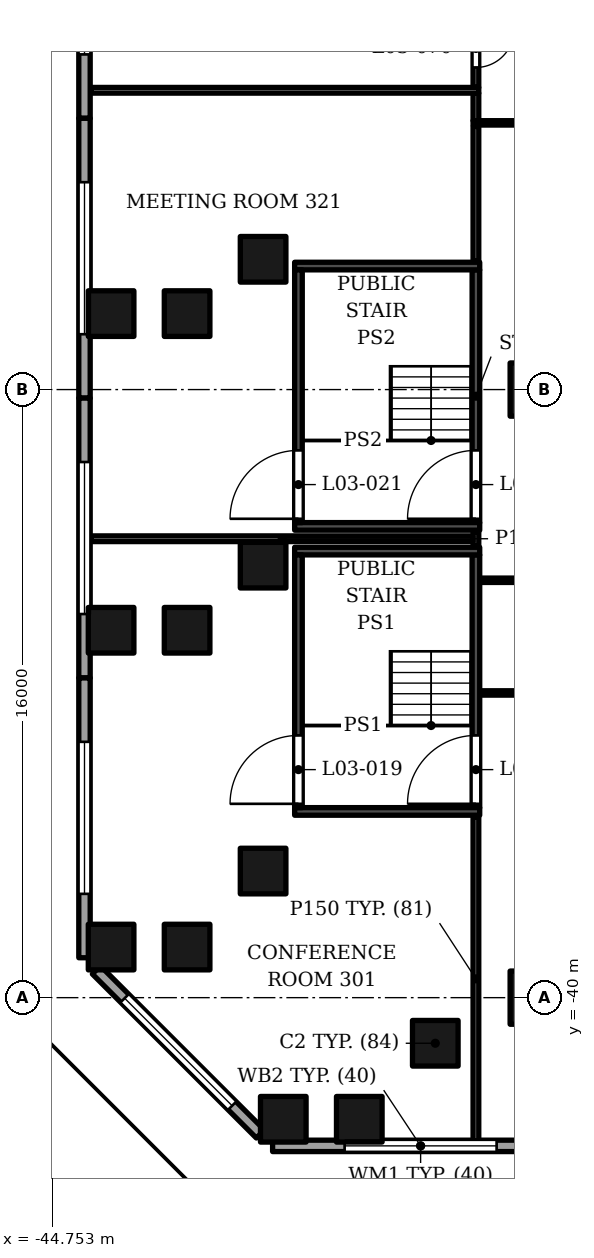
"""IFC4 building model, lengths in metres.
Left out: names, types, materials, properties, quantities, classifications, styles, units other than length and angle.
Written with IfcOpenShell. Run it as: python <this file> out.ifc"""

import sys

from ifc_helpers import new_model, si_unit, direction, frame, frame_2d, origin, origin_2d, place, context, subcontext, project, spatial, rectangle, extrude, element, fill, save


model = new_model("IFC4")
c1 = context("Model", 3, precision=1e-05, world=origin(), true_north=direction((0.0, 1.0)))
c2 = subcontext(c1, "Body", "Model", "MODEL_VIEW")
j1 = project(units=[si_unit("LENGTHUNIT", "METRE"), si_unit("PLANEANGLEUNIT", "RADIAN")], contexts=[c1])
p1 = place(None, origin())
s1 = spatial("IfcSite", under=j1, at=p1, CompositionType="ELEMENT")
p2 = place(p1, origin())
s2 = spatial("IfcBuilding", under=s1, at=p2, CompositionType="ELEMENT")
p3 = place(p2, frame((0.0, 0.0, 29.0)))
s3 = spatial("IfcBuildingStorey", under=s2, at=p3, CompositionType="ELEMENT", Elevation=29.0)
for number, where, z_axis, x_axis in (
    (1, (-32.0, -40.0, 0.0), (0.0, 0.0, 1.0), (1.0, 0.0, 0.0)),
    (2, (-32.0, -24.0, 0.0), (0.0, 0.0, 1.0), (1.0, 0.0, 0.0)),
):
    element("IfcColumn", number, at=place(p3, frame(where, z_axis=z_axis, x_axis=x_axis)), inside=s3, PredefinedType="COLUMN", context=c2, shape_type="SweptSolid", body=[
        extrude(rectangle(XDim=1.4, YDim=1.4, at=origin_2d()), origin(), (0.0, 0.0, 1.0), 5.5),
    ])
for number, where, z_axis, x_axis in (
    (3, (-34.669, -41.2, 0.0), (0.0, 0.0, 1.0), (1.0, 0.0, 0.0)),
    (4, (-39.2, -36.669, 0.0), (0.0, 0.0, 1.0), (1.0, 0.0, 0.0)),
    (5, (-39.2, -28.62, 0.0), (0.0, 0.0, 1.0), (1.0, 0.0, 0.0)),
    (6, (-39.2, -20.572, 0.0), (0.0, 0.0, 1.0), (1.0, 0.0, 0.0)),
    (7, (-36.669, -43.2, 0.0), (0.0, 0.0, 1.0), (1.0, 0.0, 0.0)),
    (8, (-41.2, -38.669, 0.0), (0.0, 0.0, 1.0), (1.0, 0.0, 0.0)),
    (9, (-41.2, -30.333, 0.0), (0.0, 0.0, 1.0), (1.0, 0.0, 0.0)),
    (10, (-41.2, -22.001, 0.0), (0.0, 0.0, 1.0), (1.0, 0.0, 0.0)),
    (11, (-38.669, -43.2, 0.0), (0.0, 0.0, 1.0), (1.0, 0.0, 0.0)),
    (12, (-43.2, -38.669, 0.0), (0.0, 0.0, 1.0), (1.0, 0.0, 0.0)),
    (13, (-43.2, -30.333, 0.0), (0.0, 0.0, 1.0), (1.0, 0.0, 0.0)),
    (14, (-43.2, -22.001, 0.0), (0.0, 0.0, 1.0), (1.0, 0.0, 0.0)),
):
    element("IfcColumn", number, at=place(p3, frame(where, z_axis=z_axis, x_axis=x_axis)), inside=s3, PredefinedType="COLUMN", context=c2, shape_type="SweptSolid", body=[
        extrude(rectangle(XDim=1.2, YDim=1.2, at=origin_2d()), origin(), (0.0, 0.0, 1.0), 5.5),
    ])
p4 = place(p3, frame((-38.95, -43.9, 0.0), z_axis=(0.0, 0.0, 1.0), x_axis=(1.0, 0.0, 0.0)))
e15 = element("IfcWall", 15, at=p4, inside=s3, PredefinedType="SOLIDWALL", context=c2, shape_type="SweptSolid", body=[
    extrude(rectangle(XDim=7.79, YDim=0.3, at=frame_2d((3.895, 0.0))), origin(), (0.0, 0.0, 1.0), 4.1),
])
p5 = place(p4, frame((1.895, 0.0, 1.0)))
e16 = element("IfcOpeningElement", 16, at=p5, cuts=e15, PredefinedType="OPENING", context=c2, shape_type="SweptSolid", body=[
    extrude(rectangle(XDim=4.0, YDim=1.8, at=frame_2d((2.0, 0.9))), frame((0.0, 0.16, 0.0), z_axis=(0.0, -1.0, 0.0), x_axis=(1.0, 0.0, 0.0)), (0.0, 0.0, 1.0), 0.32),
])
p6 = place(p3, frame((-43.9, -9.5, 0.0), z_axis=(0.0, 0.0, 1.0), x_axis=(0.0, -1.0, 0.0)))
e17 = element("IfcWall", 17, at=p6, inside=s3, PredefinedType="SOLIDWALL", context=c2, shape_type="SweptSolid", body=[
    extrude(rectangle(XDim=7.363, YDim=0.3, at=frame_2d((3.681, 0.0))), origin(), (0.0, 0.0, 1.0), 4.1),
])
p7 = place(p6, frame((1.681, 0.0, 1.0)))
e18 = element("IfcOpeningElement", 18, at=p7, cuts=e17, PredefinedType="OPENING", context=c2, shape_type="SweptSolid", body=[
    extrude(rectangle(XDim=4.0, YDim=1.8, at=frame_2d((2.0, 0.9))), frame((0.0, 0.16, 0.0), z_axis=(0.0, -1.0, 0.0), x_axis=(1.0, 0.0, 0.0)), (0.0, 0.0, 1.0), 0.32),
])
p8 = place(p3, frame((-43.9, -16.863, 0.0), z_axis=(0.0, 0.0, 1.0), x_axis=(0.0, -1.0, 0.0)))
e19 = element("IfcWall", 19, at=p8, inside=s3, PredefinedType="SOLIDWALL", context=c2, shape_type="SweptSolid", body=[
    extrude(rectangle(XDim=7.363, YDim=0.3, at=frame_2d((3.681, 0.0))), origin(), (0.0, 0.0, 1.0), 4.1),
])
p9 = place(p8, frame((1.681, 0.0, 1.0)))
e20 = element("IfcOpeningElement", 20, at=p9, cuts=e19, PredefinedType="OPENING", context=c2, shape_type="SweptSolid", body=[
    extrude(rectangle(XDim=4.0, YDim=1.8, at=frame_2d((2.0, 0.9))), frame((0.0, 0.16, 0.0), z_axis=(0.0, -1.0, 0.0), x_axis=(1.0, 0.0, 0.0)), (0.0, 0.0, 1.0), 0.32),
])
p10 = place(p3, frame((-43.9, -24.225, 0.0), z_axis=(0.0, 0.0, 1.0), x_axis=(0.0, -1.0, 0.0)))
e21 = element("IfcWall", 21, at=p10, inside=s3, PredefinedType="SOLIDWALL", context=c2, shape_type="SweptSolid", body=[
    extrude(rectangle(XDim=7.362, YDim=0.3, at=frame_2d((3.681, 0.0))), origin(), (0.0, 0.0, 1.0), 4.1),
])
p11 = place(p10, frame((1.681, 0.0, 1.0)))
e22 = element("IfcOpeningElement", 22, at=p11, cuts=e21, PredefinedType="OPENING", context=c2, shape_type="SweptSolid", body=[
    extrude(rectangle(XDim=4.0, YDim=1.8, at=frame_2d((2.0, 0.9))), frame((0.0, 0.16, 0.0), z_axis=(0.0, -1.0, 0.0), x_axis=(1.0, 0.0, 0.0)), (0.0, 0.0, 1.0), 0.32),
])
p12 = place(p3, frame((-43.9, -31.587, 0.0), z_axis=(0.0, 0.0, 1.0), x_axis=(0.0, -1.0, 0.0)))
e23 = element("IfcWall", 23, at=p12, inside=s3, PredefinedType="SOLIDWALL", context=c2, shape_type="SweptSolid", body=[
    extrude(rectangle(XDim=7.363, YDim=0.3, at=frame_2d((3.681, 0.0))), origin(), (0.0, 0.0, 1.0), 4.1),
])
p13 = place(p12, frame((1.681, 0.0, 1.0)))
e24 = element("IfcOpeningElement", 24, at=p13, cuts=e23, PredefinedType="OPENING", context=c2, shape_type="SweptSolid", body=[
    extrude(rectangle(XDim=4.0, YDim=1.8, at=frame_2d((2.0, 0.9))), frame((0.0, 0.16, 0.0), z_axis=(0.0, -1.0, 0.0), x_axis=(1.0, 0.0, 0.0)), (0.0, 0.0, 1.0), 0.32),
])
p14 = place(p3, frame((-43.588, -39.271, 0.0), z_axis=(0.0, 0.0, 1.0), x_axis=(0.707106781187, -0.707106781187, 0.0)))
e25 = element("IfcWall", 25, at=p14, inside=s3, PredefinedType="SOLIDWALL", context=c2, shape_type="SweptSolid", body=[
    extrude(rectangle(XDim=6.105, YDim=0.3, at=frame_2d((3.052, 0.0))), origin(), (0.0, 0.0, 1.0), 4.1),
])
p15 = place(p14, frame((1.052, 0.0, 1.0)))
e26 = element("IfcOpeningElement", 26, at=p15, cuts=e25, PredefinedType="OPENING", context=c2, shape_type="SweptSolid", body=[
    extrude(rectangle(XDim=4.0, YDim=1.8, at=frame_2d((2.0, 0.9))), frame((0.0, 0.16, 0.0), z_axis=(0.0, -1.0, 0.0), x_axis=(1.0, 0.0, 0.0)), (0.0, 0.0, 1.0), 0.32),
])
p16 = place(p3, frame((-39.0, -43.85, 5.5), z_axis=(0.0, 0.0, 1.0), x_axis=(1.0, 0.0, 0.0)))
e27 = element("IfcWall", 27, at=p16, inside=s3, PredefinedType="PARAPET", context=c2, shape_type="SweptSolid", body=[
    extrude(rectangle(XDim=1.25, YDim=0.3, at=frame_2d((0.625, 0.0))), origin(), (0.0, 0.0, 1.0), 1.1),
])
for number, where, z_axis, x_axis in (
    (28, (-43.85, -9.605, 5.5), (0.0, 0.0, 1.0), (0.0, -1.0, 0.0)),
    (29, (-43.85, -24.302, 5.5), (0.0, 0.0, 1.0), (0.0, -1.0, 0.0)),
):
    element("IfcWall", number, at=place(p3, frame(where, z_axis=z_axis, x_axis=x_axis)), inside=s3, PredefinedType="PARAPET", context=c2, shape_type="SweptSolid", body=[
        extrude(rectangle(XDim=14.698, YDim=0.3, at=frame_2d((7.349, 0.0))), origin(), (0.0, 0.0, 1.0), 1.1),
    ])
p17 = place(p3, frame((-43.745, -39.042, 5.5), z_axis=(0.0, 0.0, 1.0), x_axis=(0.70708898898, -0.707124572946, 0.0)))
e30 = element("IfcWall", 30, at=p17, inside=s3, PredefinedType="PARAPET", context=c2, shape_type="SweptSolid", body=[
    extrude(rectangle(XDim=6.861, YDim=0.3, at=frame_2d((3.431, 0.0))), origin(), (0.0, 0.0, 1.0), 1.1),
])
for number, where, z_axis, x_axis in (
    (31, (-38.37, -35.1, 0.0), (0.0, 0.0, 1.0), (1.0, 0.0, 0.0)),
    (32, (-38.37, -28.25, 0.0), (0.0, 0.0, 1.0), (1.0, 0.0, 0.0)),
):
    element("IfcWall", number, at=place(p3, frame(where, z_axis=z_axis, x_axis=x_axis)), inside=s3, PredefinedType="SOLIDWALL", context=c2, shape_type="SweptSolid", body=[
        extrude(rectangle(XDim=4.87, YDim=0.2, at=frame_2d((2.435, 0.0))), origin(), (0.0, 0.0, 1.0), 5.05),
    ])
p18 = place(p3, frame((-38.27, -35.0, 0.0), z_axis=(0.0, 0.0, 1.0), x_axis=(0.0, 1.0, 0.0)))
e33 = element("IfcWall", 33, at=p18, inside=s3, PredefinedType="SOLIDWALL", context=c2, shape_type="SweptSolid", body=[
    extrude(rectangle(XDim=6.65, YDim=0.2, at=frame_2d((3.325, 0.0))), origin(), (0.0, 0.0, 1.0), 5.05),
])
p19 = place(p18, frame((0.1, 0.0, 0.0)))
e34 = element("IfcOpeningElement", 34, at=p19, cuts=e33, PredefinedType="OPENING", context=c2, shape_type="SweptSolid", body=[
    extrude(rectangle(XDim=1.8, YDim=2.4, at=frame_2d((0.9, 1.2))), frame((0.0, 0.11, 0.0), z_axis=(0.0, -1.0, 0.0), x_axis=(1.0, 0.0, 0.0)), (0.0, 0.0, 1.0), 0.22),
])
p20 = place(p3, frame((-33.6, -35.0, 0.0), z_axis=(0.0, 0.0, 1.0), x_axis=(0.0, 1.0, 0.0)))
e35 = element("IfcWall", 35, at=p20, inside=s3, PredefinedType="SOLIDWALL", context=c2, shape_type="SweptSolid", body=[
    extrude(rectangle(XDim=6.65, YDim=0.2, at=frame_2d((3.325, 0.0))), origin(), (0.0, 0.0, 1.0), 5.05),
])
p21 = place(p20, frame((0.1, 0.0, 0.0)))
e36 = element("IfcOpeningElement", 36, at=p21, cuts=e35, PredefinedType="OPENING", context=c2, shape_type="SweptSolid", body=[
    extrude(rectangle(XDim=1.8, YDim=2.4, at=frame_2d((0.9, 1.2))), frame((0.0, 0.11, 0.0), z_axis=(0.0, -1.0, 0.0), x_axis=(1.0, 0.0, 0.0)), (0.0, 0.0, 1.0), 0.22),
])
for number, where, z_axis, x_axis in (
    (37, (-38.37, -27.6, 0.0), (0.0, 0.0, 1.0), (1.0, 0.0, 0.0)),
    (38, (-38.37, -20.75, 0.0), (0.0, 0.0, 1.0), (1.0, 0.0, 0.0)),
):
    element("IfcWall", number, at=place(p3, frame(where, z_axis=z_axis, x_axis=x_axis)), inside=s3, PredefinedType="SOLIDWALL", context=c2, shape_type="SweptSolid", body=[
        extrude(rectangle(XDim=4.87, YDim=0.2, at=frame_2d((2.435, 0.0))), origin(), (0.0, 0.0, 1.0), 5.05),
    ])
p22 = place(p3, frame((-38.27, -27.5, 0.0), z_axis=(0.0, 0.0, 1.0), x_axis=(0.0, 1.0, 0.0)))
e39 = element("IfcWall", 39, at=p22, inside=s3, PredefinedType="SOLIDWALL", context=c2, shape_type="SweptSolid", body=[
    extrude(rectangle(XDim=6.65, YDim=0.2, at=frame_2d((3.325, 0.0))), origin(), (0.0, 0.0, 1.0), 5.05),
])
p23 = place(p22, frame((0.1, 0.0, 0.0)))
e40 = element("IfcOpeningElement", 40, at=p23, cuts=e39, PredefinedType="OPENING", context=c2, shape_type="SweptSolid", body=[
    extrude(rectangle(XDim=1.8, YDim=2.4, at=frame_2d((0.9, 1.2))), frame((0.0, 0.11, 0.0), z_axis=(0.0, -1.0, 0.0), x_axis=(1.0, 0.0, 0.0)), (0.0, 0.0, 1.0), 0.22),
])
p24 = place(p3, frame((-33.6, -27.5, 0.0), z_axis=(0.0, 0.0, 1.0), x_axis=(0.0, 1.0, 0.0)))
e41 = element("IfcWall", 41, at=p24, inside=s3, PredefinedType="SOLIDWALL", context=c2, shape_type="SweptSolid", body=[
    extrude(rectangle(XDim=6.65, YDim=0.2, at=frame_2d((3.325, 0.0))), origin(), (0.0, 0.0, 1.0), 5.05),
])
p25 = place(p24, frame((0.1, 0.0, 0.0)))
e42 = element("IfcOpeningElement", 42, at=p25, cuts=e41, PredefinedType="OPENING", context=c2, shape_type="SweptSolid", body=[
    extrude(rectangle(XDim=1.8, YDim=2.4, at=frame_2d((0.9, 1.2))), frame((0.0, 0.11, 0.0), z_axis=(0.0, -1.0, 0.0), x_axis=(1.0, 0.0, 0.0)), (0.0, 0.0, 1.0), 0.22),
])
p26 = place(p3, frame((-33.6, -43.77, 0.0), z_axis=(0.0, 0.0, 1.0), x_axis=(0.0, 1.0, 0.0)))
e43 = element("IfcWall", 43, at=p26, inside=s3, PredefinedType="PARTITIONING", context=c2, shape_type="SweptSolid", body=[
    extrude(rectangle(XDim=8.53, YDim=0.15, at=frame_2d((4.265, 0.0))), origin(), (0.0, 0.0, 1.0), 3.85),
])
p27 = place(p3, frame((-33.46, -31.982, 0.0), z_axis=(0.0, 0.0, 1.0), x_axis=(1.0, 0.0, 0.0)))
e44 = element("IfcWall", 44, at=p27, inside=s3, PredefinedType="PARTITIONING", context=c2, shape_type="SweptSolid", body=[
    extrude(rectangle(XDim=18.69, YDim=0.115, at=frame_2d((9.345, 0.0))), origin(), (0.0, 0.0, 1.0), 3.85),
])
p28 = place(p27, frame((4.06, 0.0, 0.0)))
e45 = element("IfcOpeningElement", 45, at=p28, cuts=e44, PredefinedType="OPENING", context=c2, shape_type="SweptSolid", body=[
    extrude(rectangle(XDim=1.0, YDim=2.1, at=frame_2d((0.5, 1.05))), frame((0.0, 0.067, 0.0), z_axis=(0.0, -1.0, 0.0), x_axis=(1.0, 0.0, 0.0)), (0.0, 0.0, 1.0), 0.135),
])
p29 = place(p3, frame((-33.46, -29.018, 0.0), z_axis=(0.0, 0.0, 1.0), x_axis=(1.0, 0.0, 0.0)))
e46 = element("IfcWall", 46, at=p29, inside=s3, PredefinedType="PARTITIONING", context=c2, shape_type="SweptSolid", body=[
    extrude(rectangle(XDim=18.69, YDim=0.115, at=frame_2d((9.345, 0.0))), origin(), (0.0, 0.0, 1.0), 3.85),
])
p30 = place(p3, frame((-33.6, -28.11, 0.0), z_axis=(0.0, 0.0, 1.0), x_axis=(0.0, 1.0, 0.0)))
e47 = element("IfcWall", 47, at=p30, inside=s3, PredefinedType="PARTITIONING", context=c2, shape_type="SweptSolid", body=[
    extrude(rectangle(XDim=0.37, YDim=0.15, at=frame_2d((0.185, 0.0))), origin(), (0.0, 0.0, 1.0), 5.05),
])
p31 = place(p3, frame((-43.72, -27.925, 0.0), z_axis=(0.0, 0.0, 1.0), x_axis=(1.0, 0.0, 0.0)))
e48 = element("IfcWall", 48, at=p31, inside=s3, PredefinedType="PARTITIONING", context=c2, shape_type="SweptSolid", body=[
    extrude(rectangle(XDim=10.045, YDim=0.15, at=frame_2d((5.022, 0.0))), origin(), (0.0, 0.0, 1.0), 4.15),
])
p32 = place(p3, frame((-33.6, -20.61, 0.0), z_axis=(0.0, 0.0, 1.0), x_axis=(0.0, 1.0, 0.0)))
e49 = element("IfcWall", 49, at=p32, inside=s3, PredefinedType="PARTITIONING", context=c2, shape_type="SweptSolid", body=[
    extrude(rectangle(XDim=3.535, YDim=0.15, at=frame_2d((1.768, 0.0))), origin(), (0.0, 0.0, 1.0), 5.05),
])
p33 = place(p3, frame((-33.675, -16.982, 0.0), z_axis=(0.0, 0.0, 1.0), x_axis=(1.0, 0.0, 0.0)))
e50 = element("IfcWall", 50, at=p33, inside=s3, PredefinedType="PARTITIONING", context=c2, shape_type="SweptSolid", body=[
    extrude(rectangle(XDim=18.905, YDim=0.115, at=frame_2d((9.453, 0.0))), origin(), (0.0, 0.0, 1.0), 3.85),
])
p34 = place(p33, frame((4.275, 0.0, 0.0)))
e51 = element("IfcOpeningElement", 51, at=p34, cuts=e50, PredefinedType="OPENING", context=c2, shape_type="SweptSolid", body=[
    extrude(rectangle(XDim=1.0, YDim=2.1, at=frame_2d((0.5, 1.05))), frame((0.0, 0.067, 0.0), z_axis=(0.0, -1.0, 0.0), x_axis=(1.0, 0.0, 0.0)), (0.0, 0.0, 1.0), 0.135),
])
p35 = place(p3, frame((-33.6, -16.925, 0.0), z_axis=(0.0, 0.0, 1.0), x_axis=(0.0, 1.0, 0.0)))
e52 = element("IfcWall", 52, at=p35, inside=s3, PredefinedType="PARTITIONING", context=c2, shape_type="SweptSolid", body=[
    extrude(rectangle(XDim=0.725, YDim=0.15, at=frame_2d((0.363, 0.0))), origin(), (0.0, 0.0, 1.0), 5.05),
])
p36 = place(p3, frame((-43.72, -16.125, 0.0), z_axis=(0.0, 0.0, 1.0), x_axis=(1.0, 0.0, 0.0)))
e53 = element("IfcWall", 53, at=p36, inside=s3, PredefinedType="PARTITIONING", context=c2, shape_type="SweptSolid", body=[
    extrude(rectangle(XDim=10.195, YDim=0.15, at=frame_2d((5.098, 0.0))), origin(), (0.0, 0.0, 1.0), 4.15),
])
p37 = place(p3, frame((-33.6, -16.05, 0.0), z_axis=(0.0, 0.0, 1.0), x_axis=(0.0, 1.0, 0.0)))
e54 = element("IfcWall", 54, at=p37, inside=s3, PredefinedType="PARTITIONING", context=c2, shape_type="SweptSolid", body=[
    extrude(rectangle(XDim=1.975, YDim=0.15, at=frame_2d((0.988, 0.0))), origin(), (0.0, 0.0, 1.0), 5.05),
])
p38 = place(p37, frame((0.525, 0.0, 0.0)))
e55 = element("IfcOpeningElement", 55, at=p38, cuts=e54, PredefinedType="OPENING", context=c2, shape_type="SweptSolid", body=[
    extrude(rectangle(XDim=1.0, YDim=2.1, at=frame_2d((0.5, 1.05))), frame((0.0, 0.085, 0.0), z_axis=(0.0, -1.0, 0.0), x_axis=(1.0, 0.0, 0.0)), (0.0, 0.0, 1.0), 0.17),
])
p39 = place(p5, origin())
e56 = element("IfcWindow", 56, at=p39, inside=s3, PartitioningType="SINGLE_PANEL", PredefinedType="WINDOW", context=c2, shape_type="SweptSolid", body=[
    extrude(rectangle(XDim=4.0, YDim=1.8, at=frame_2d((2.0, 0.9))), frame((0.0, 0.03, 0.0), z_axis=(0.0, -1.0, 0.0), x_axis=(1.0, 0.0, 0.0)), (0.0, 0.0, 1.0), 0.06),
])
fill(e16, e56)
p40 = place(p7, origin())
e57 = element("IfcWindow", 57, at=p40, inside=s3, PartitioningType="SINGLE_PANEL", PredefinedType="WINDOW", context=c2, shape_type="SweptSolid", body=[
    extrude(rectangle(XDim=4.0, YDim=1.8, at=frame_2d((2.0, 0.9))), frame((0.0, 0.03, 0.0), z_axis=(0.0, -1.0, 0.0), x_axis=(1.0, 0.0, 0.0)), (0.0, 0.0, 1.0), 0.06),
])
fill(e18, e57)
p41 = place(p9, origin())
e58 = element("IfcWindow", 58, at=p41, inside=s3, PartitioningType="SINGLE_PANEL", PredefinedType="WINDOW", context=c2, shape_type="SweptSolid", body=[
    extrude(rectangle(XDim=4.0, YDim=1.8, at=frame_2d((2.0, 0.9))), frame((0.0, 0.03, 0.0), z_axis=(0.0, -1.0, 0.0), x_axis=(1.0, 0.0, 0.0)), (0.0, 0.0, 1.0), 0.06),
])
fill(e20, e58)
p42 = place(p11, origin())
e59 = element("IfcWindow", 59, at=p42, inside=s3, PartitioningType="SINGLE_PANEL", PredefinedType="WINDOW", context=c2, shape_type="SweptSolid", body=[
    extrude(rectangle(XDim=4.0, YDim=1.8, at=frame_2d((2.0, 0.9))), frame((0.0, 0.03, 0.0), z_axis=(0.0, -1.0, 0.0), x_axis=(1.0, 0.0, 0.0)), (0.0, 0.0, 1.0), 0.06),
])
fill(e22, e59)
p43 = place(p13, origin())
e60 = element("IfcWindow", 60, at=p43, inside=s3, PartitioningType="SINGLE_PANEL", PredefinedType="WINDOW", context=c2, shape_type="SweptSolid", body=[
    extrude(rectangle(XDim=4.0, YDim=1.8, at=frame_2d((2.0, 0.9))), frame((0.0, 0.03, 0.0), z_axis=(0.0, -1.0, 0.0), x_axis=(1.0, 0.0, 0.0)), (0.0, 0.0, 1.0), 0.06),
])
fill(e24, e60)
p44 = place(p15, origin())
e61 = element("IfcWindow", 61, at=p44, inside=s3, PartitioningType="SINGLE_PANEL", PredefinedType="WINDOW", context=c2, shape_type="SweptSolid", body=[
    extrude(rectangle(XDim=4.0, YDim=1.8, at=frame_2d((2.0, 0.9))), frame((0.0, 0.03, 0.0), z_axis=(0.0, -1.0, 0.0), x_axis=(1.0, 0.0, 0.0)), (0.0, 0.0, 1.0), 0.06),
])
fill(e26, e61)
p45 = place(p21, origin())
e62 = element("IfcDoor", 62, at=p45, inside=s3, OperationType="DOUBLE_DOOR_SINGLE_SWING", PredefinedType="DOOR", context=c2, shape_type="SweptSolid", body=[
    extrude(rectangle(XDim=1.8, YDim=2.4, at=frame_2d((0.9, 1.2))), frame((0.0, 0.025, 0.0), z_axis=(0.0, -1.0, 0.0), x_axis=(1.0, 0.0, 0.0)), (0.0, 0.0, 1.0), 0.05),
])
fill(e36, e62)
p46 = place(p19, origin())
e63 = element("IfcDoor", 63, at=p46, inside=s3, OperationType="DOUBLE_DOOR_SINGLE_SWING", PredefinedType="DOOR", context=c2, shape_type="SweptSolid", body=[
    extrude(rectangle(XDim=1.8, YDim=2.4, at=frame_2d((0.9, 1.2))), frame((0.0, 0.025, 0.0), z_axis=(0.0, -1.0, 0.0), x_axis=(1.0, 0.0, 0.0)), (0.0, 0.0, 1.0), 0.05),
])
fill(e34, e63)
p47 = place(p25, origin())
e64 = element("IfcDoor", 64, at=p47, inside=s3, OperationType="DOUBLE_DOOR_SINGLE_SWING", PredefinedType="DOOR", context=c2, shape_type="SweptSolid", body=[
    extrude(rectangle(XDim=1.8, YDim=2.4, at=frame_2d((0.9, 1.2))), frame((0.0, 0.025, 0.0), z_axis=(0.0, -1.0, 0.0), x_axis=(1.0, 0.0, 0.0)), (0.0, 0.0, 1.0), 0.05),
])
fill(e42, e64)
p48 = place(p23, origin())
e65 = element("IfcDoor", 65, at=p48, inside=s3, OperationType="DOUBLE_DOOR_SINGLE_SWING", PredefinedType="DOOR", context=c2, shape_type="SweptSolid", body=[
    extrude(rectangle(XDim=1.8, YDim=2.4, at=frame_2d((0.9, 1.2))), frame((0.0, 0.025, 0.0), z_axis=(0.0, -1.0, 0.0), x_axis=(1.0, 0.0, 0.0)), (0.0, 0.0, 1.0), 0.05),
])
fill(e40, e65)
p49 = place(p38, origin())
e66 = element("IfcDoor", 66, at=p49, inside=s3, OperationType="SINGLE_SWING_RIGHT", PredefinedType="DOOR", context=c2, shape_type="SweptSolid", body=[
    extrude(rectangle(XDim=1.0, YDim=2.1, at=frame_2d((0.5, 1.05))), frame((0.0, 0.025, 0.0), z_axis=(0.0, -1.0, 0.0), x_axis=(1.0, 0.0, 0.0)), (0.0, 0.0, 1.0), 0.05),
])
fill(e55, e66)
save(model, sys.argv[1])
